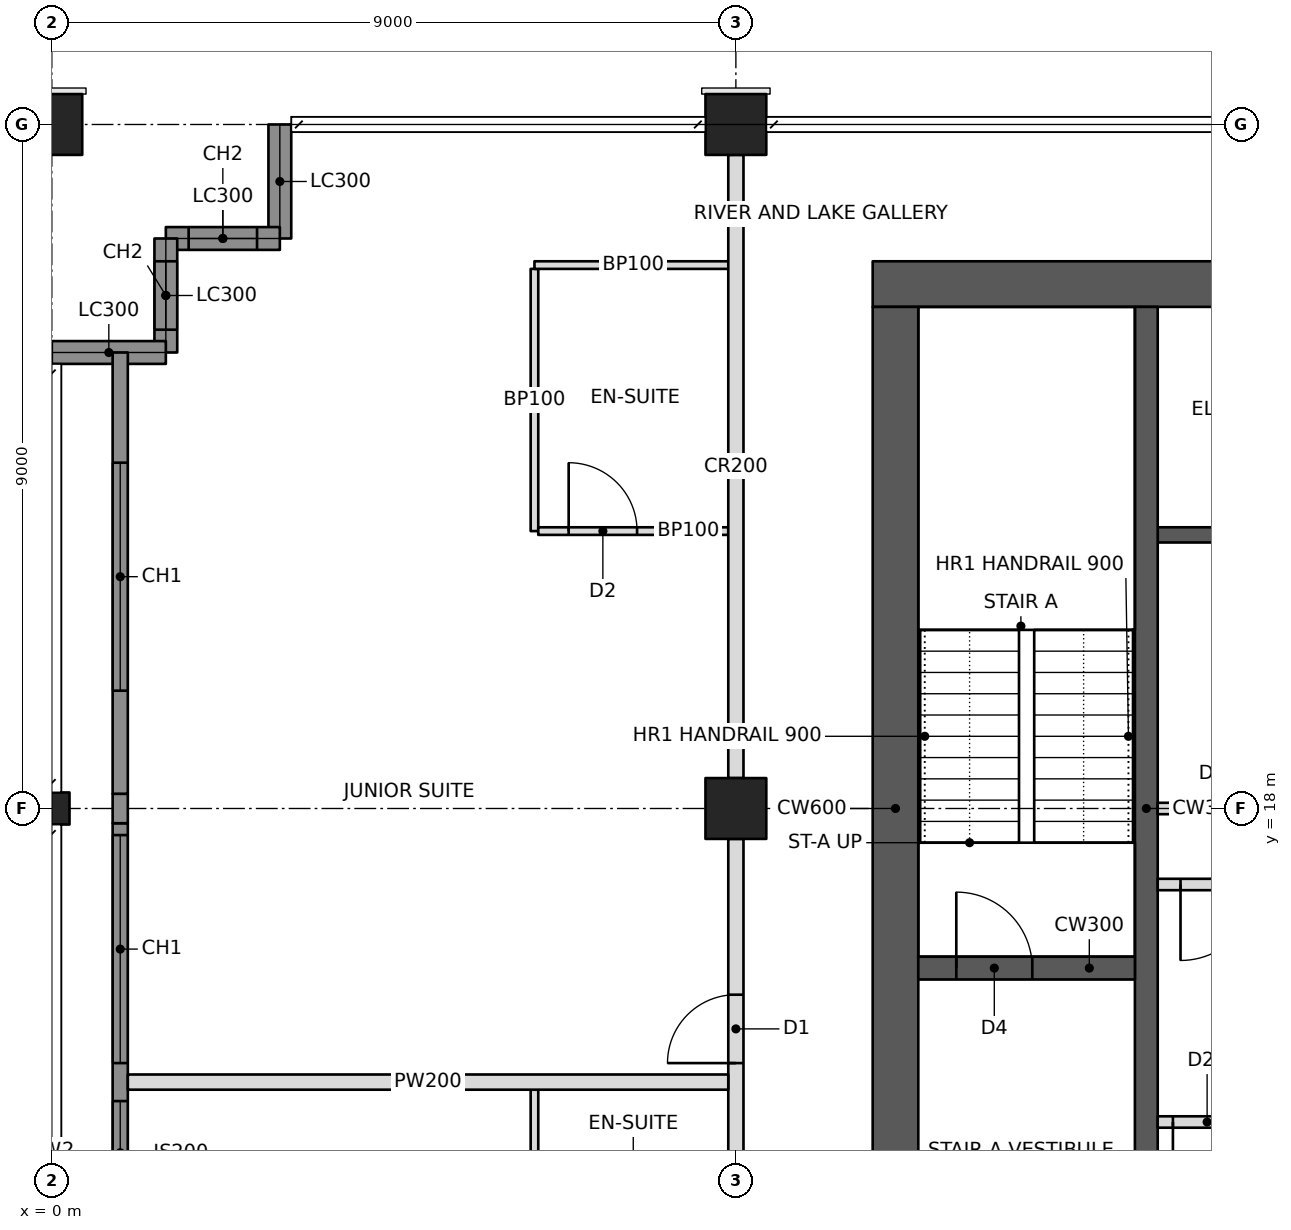
"""IFC4 building model, lengths in metres.
Left out: names, types, materials, properties, quantities, classifications, styles, units other than length and angle.
Written with IfcOpenShell. Run it as: python <this file> out.ifc"""

import sys

from ifc_helpers import new_model, si_unit, direction, frame, frame_2d, origin, origin_2d, place, context, subcontext, project, spatial, rectangle, hollow_rectangle, i_section, extrude, element, fill, save


model = new_model("IFC4")
c1 = context("Model", 3, precision=1e-05, world=origin(), true_north=direction((0.0, 1.0)))
c2 = subcontext(c1, "Body", "Model", "MODEL_VIEW")
j1 = project(units=[si_unit("LENGTHUNIT", "METRE"), si_unit("PLANEANGLEUNIT", "RADIAN")], contexts=[c1])
p1 = place(None, origin())
s1 = spatial("IfcSite", under=j1, at=p1, CompositionType="ELEMENT")
p2 = place(p1, origin())
s2 = spatial("IfcBuilding", under=s1, at=p2, CompositionType="ELEMENT")
p3 = place(p2, frame((0.0, 0.0, 244.6)))
s3 = spatial("IfcBuildingStorey", under=s2, at=p3, CompositionType="ELEMENT", Elevation=244.6)
p4 = place(p3, frame((0.0, 18.0, 0.0), z_axis=(0.0, 0.0, 1.0), x_axis=(0.0, 1.0, 0.0)))
e1 = element("IfcColumn", 1, at=p4, inside=s3, PredefinedType="COLUMN", context=c2, shape_type="SweptSolid", body=[
    extrude(i_section(OverallWidth=0.422, OverallDepth=0.465, WebThickness=0.045, FlangeThickness=0.073, at=origin_2d()), origin(), (0.0, 0.0, 1.0), 3.6),
])
p5 = place(p3, frame((0.0, 27.0, 0.0), z_axis=(0.0, 0.0, 1.0), x_axis=(0.0, 1.0, 0.0)))
e2 = element("IfcColumn", 2, at=p5, inside=s3, PredefinedType="COLUMN", context=c2, shape_type="SweptSolid", body=[
    extrude(hollow_rectangle(XDim=0.8, YDim=0.8, WallThickness=0.05, at=origin_2d()), origin(), (0.0, 0.0, 1.0), 3.6),
])
p6 = place(p3, frame((9.0, 18.0, 0.0), z_axis=(0.0, 0.0, 1.0), x_axis=(1.0, 0.0, 0.0)))
e3 = element("IfcColumn", 3, at=p6, inside=s3, PredefinedType="COLUMN", context=c2, shape_type="SweptSolid", body=[
    extrude(hollow_rectangle(XDim=0.8, YDim=0.8, WallThickness=0.04, at=origin_2d()), origin(), (0.0, 0.0, 1.0), 3.6),
])
p7 = place(p3, frame((9.0, 27.0, 0.0), z_axis=(0.0, 0.0, 1.0), x_axis=(1.0, 0.0, 0.0)))
e4 = element("IfcColumn", 4, at=p7, inside=s3, PredefinedType="COLUMN", context=c2, shape_type="SweptSolid", body=[
    extrude(hollow_rectangle(XDim=0.8, YDim=0.8, WallThickness=0.05, at=origin_2d()), origin(), (0.0, 0.0, 1.0), 3.6),
])
p8 = place(p3, frame((10.8, 24.9, 0.0), z_axis=(0.0, 0.0, 1.0), x_axis=(1.0, 0.0, 0.0)))
e5 = element("IfcWall", 5, at=p8, inside=s3, PredefinedType="SHEAR", context=c2, shape_type="SweptSolid", body=[
    extrude(rectangle(XDim=23.4, YDim=0.6, at=frame_2d((11.7, 0.0))), origin(), (0.0, 0.0, 1.0), 3.6),
])
p9 = place(p8, frame((17.2, 0.0, 0.0)))
e6 = element("IfcOpeningElement", 6, at=p9, cuts=e5, PredefinedType="OPENING", context=c2, shape_type="SweptSolid", body=[
    extrude(rectangle(XDim=1.8, YDim=2.1, at=frame_2d((0.9, 1.05))), frame((0.0, 0.31, 0.0), z_axis=(0.0, -1.0, 0.0), x_axis=(1.0, 0.0, 0.0)), (0.0, 0.0, 1.0), 0.62),
])
p10 = place(p8, frame((21.1, 0.0, 0.0)))
e7 = element("IfcOpeningElement", 7, at=p10, cuts=e5, PredefinedType="OPENING", context=c2, shape_type="SweptSolid", body=[
    extrude(rectangle(XDim=1.0, YDim=2.1, at=frame_2d((0.5, 1.05))), frame((0.0, 0.31, 0.0), z_axis=(0.0, -1.0, 0.0), x_axis=(1.0, 0.0, 0.0)), (0.0, 0.0, 1.0), 0.62),
])
p11 = place(p8, frame((4.9, 0.0, 0.0)))
e8 = element("IfcOpeningElement", 8, at=p11, cuts=e5, PredefinedType="OPENING", context=c2, shape_type="SweptSolid", body=[
    extrude(rectangle(XDim=1.0, YDim=2.1, at=frame_2d((0.5, 1.05))), frame((0.0, 0.31, 0.0), z_axis=(0.0, -1.0, 0.0), x_axis=(1.0, 0.0, 0.0)), (0.0, 0.0, 1.0), 0.62),
])
p12 = place(p3, frame((11.1, 11.4, 0.0), z_axis=(0.0, 0.0, 1.0), x_axis=(0.0, 1.0, 0.0)))
e9 = element("IfcWall", 9, at=p12, inside=s3, PredefinedType="SHEAR", context=c2, shape_type="SweptSolid", body=[
    extrude(rectangle(XDim=13.2, YDim=0.6, at=frame_2d((6.6, 0.0))), origin(), (0.0, 0.0, 1.0), 3.6),
])
p13 = place(p3, frame((14.4, 11.4, 0.0), z_axis=(0.0, 0.0, 1.0), x_axis=(0.0, 1.0, 0.0)))
e10 = element("IfcWall", 10, at=p13, inside=s3, PredefinedType="SHEAR", context=c2, shape_type="SweptSolid", body=[
    extrude(rectangle(XDim=13.2, YDim=0.3, at=frame_2d((6.6, 0.0))), origin(), (0.0, 0.0, 1.0), 3.6),
])
p14 = place(p3, frame((11.4, 15.9, 0.0), z_axis=(0.0, 0.0, 1.0), x_axis=(1.0, 0.0, 0.0)))
e11 = element("IfcWall", 11, at=p14, inside=s3, PredefinedType="SHEAR", context=c2, shape_type="SweptSolid", body=[
    extrude(rectangle(XDim=2.85, YDim=0.3, at=frame_2d((1.425, 0.0))), origin(), (0.0, 0.0, 1.0), 3.6),
])
p15 = place(p14, frame((0.5, 0.0, 0.0)))
e12 = element("IfcOpeningElement", 12, at=p15, cuts=e11, PredefinedType="OPENING", context=c2, shape_type="SweptSolid", body=[
    extrude(rectangle(XDim=1.0, YDim=2.1, at=frame_2d((0.5, 1.05))), frame((0.0, 0.16, 0.0), z_axis=(0.0, -1.0, 0.0), x_axis=(1.0, 0.0, 0.0)), (0.0, 0.0, 1.0), 0.32),
])
p16 = place(p3, frame((14.55, 18.0, 0.0), z_axis=(0.0, 0.0, 1.0), x_axis=(1.0, 0.0, 0.0)))
e13 = element("IfcWall", 13, at=p16, inside=s3, PredefinedType="PARTITIONING", context=c2, shape_type="SweptSolid", body=[
    extrude(rectangle(XDim=3.3, YDim=0.15, at=frame_2d((1.65, 0.0))), origin(), (0.0, 0.0, 1.0), 3.4),
])
p17 = place(p3, frame((14.55, 21.6, 0.0), z_axis=(0.0, 0.0, 1.0), x_axis=(1.0, 0.0, 0.0)))
e14 = element("IfcWall", 14, at=p17, inside=s3, PredefinedType="SHEAR", context=c2, shape_type="SweptSolid", body=[
    extrude(rectangle(XDim=3.3, YDim=0.2, at=frame_2d((1.65, 0.0))), origin(), (0.0, 0.0, 1.0), 3.6),
])
p18 = place(p3, frame((3.0, 27.0, 0.0), z_axis=(0.0, 0.0, 1.0), x_axis=(0.0, -1.0, 0.0)))
e15 = element("IfcWall", 15, at=p18, inside=s3, PredefinedType="SOLIDWALL", context=c2, shape_type="SweptSolid", body=[
    extrude(rectangle(XDim=1.5, YDim=0.3, at=frame_2d((0.75, 0.0))), origin(), (0.0, 0.0, 1.0), 2.62),
])
p19 = place(p3, frame((3.0, 25.5, 0.0), z_axis=(0.0, 0.0, 1.0), x_axis=(-1.0, 0.0, 0.0)))
e16 = element("IfcWall", 16, at=p19, inside=s3, PredefinedType="SOLIDWALL", context=c2, shape_type="SweptSolid", body=[
    extrude(rectangle(XDim=1.5, YDim=0.3, at=frame_2d((0.75, 0.0))), origin(), (0.0, 0.0, 1.0), 3.4),
])
p20 = place(p19, frame((0.3, 0.0, 0.6)))
e17 = element("IfcOpeningElement", 17, at=p20, cuts=e16, PredefinedType="OPENING", context=c2, shape_type="SweptSolid", body=[
    extrude(rectangle(XDim=0.9, YDim=2.2, at=frame_2d((0.45, 1.1))), frame((0.0, 0.16, 0.0), z_axis=(0.0, -1.0, 0.0), x_axis=(1.0, 0.0, 0.0)), (0.0, 0.0, 1.0), 0.32),
])
p21 = place(p3, frame((1.5, 25.5, 0.0), z_axis=(0.0, 0.0, 1.0), x_axis=(0.0, -1.0, 0.0)))
e18 = element("IfcWall", 18, at=p21, inside=s3, PredefinedType="SOLIDWALL", context=c2, shape_type="SweptSolid", body=[
    extrude(rectangle(XDim=1.5, YDim=0.3, at=frame_2d((0.75, 0.0))), origin(), (0.0, 0.0, 1.0), 3.4),
])
p22 = place(p21, frame((0.3, 0.0, 0.6)))
e19 = element("IfcOpeningElement", 19, at=p22, cuts=e18, PredefinedType="OPENING", context=c2, shape_type="SweptSolid", body=[
    extrude(rectangle(XDim=0.9, YDim=2.2, at=frame_2d((0.45, 1.1))), frame((0.0, 0.16, 0.0), z_axis=(0.0, -1.0, 0.0), x_axis=(1.0, 0.0, 0.0)), (0.0, 0.0, 1.0), 0.32),
])
p23 = place(p3, frame((1.5, 24.0, 0.0), z_axis=(0.0, 0.0, 1.0), x_axis=(-1.0, 0.0, 0.0)))
e20 = element("IfcWall", 20, at=p23, inside=s3, PredefinedType="SOLIDWALL", context=c2, shape_type="SweptSolid", body=[
    extrude(rectangle(XDim=1.5, YDim=0.3, at=frame_2d((0.75, 0.0))), origin(), (0.0, 0.0, 1.0), 2.62),
])
p24 = place(p3, frame((9.0, 10.8, 0.0), z_axis=(0.0, 0.0, 1.0), x_axis=(0.0, 1.0, 0.0)))
e21 = element("IfcWall", 21, at=p24, inside=s3, PredefinedType="PARTITIONING", context=c2, shape_type="SweptSolid", body=[
    extrude(rectangle(XDim=6.8, YDim=0.2, at=frame_2d((3.4, 0.0))), origin(), (0.0, 0.0, 1.0), 2.605),
])
p25 = place(p24, frame((0.25, 0.0, 0.0)))
e22 = element("IfcOpeningElement", 22, at=p25, cuts=e21, PredefinedType="OPENING", context=c2, shape_type="SweptSolid", body=[
    extrude(rectangle(XDim=0.9, YDim=2.1, at=frame_2d((0.45, 1.05))), frame((0.0, 0.11, 0.0), z_axis=(0.0, -1.0, 0.0), x_axis=(1.0, 0.0, 0.0)), (0.0, 0.0, 1.0), 0.22),
])
p26 = place(p24, frame((3.85, 0.0, 0.0)))
e23 = element("IfcOpeningElement", 23, at=p26, cuts=e21, PredefinedType="OPENING", context=c2, shape_type="SweptSolid", body=[
    extrude(rectangle(XDim=0.9, YDim=2.1, at=frame_2d((0.45, 1.05))), frame((0.0, 0.11, 0.0), z_axis=(0.0, -1.0, 0.0), x_axis=(1.0, 0.0, 0.0)), (0.0, 0.0, 1.0), 0.22),
])
p27 = place(p3, frame((9.0, 18.4, 0.0), z_axis=(0.0, 0.0, 1.0), x_axis=(0.0, 1.0, 0.0)))
e24 = element("IfcWall", 24, at=p27, inside=s3, PredefinedType="PARTITIONING", context=c2, shape_type="SweptSolid", body=[
    extrude(rectangle(XDim=8.2, YDim=0.2, at=frame_2d((4.1, 0.0))), origin(), (0.0, 0.0, 1.0), 2.605),
])
p28 = place(p3, frame((8.9, 14.4, 0.0), z_axis=(0.0, 0.0, 1.0), x_axis=(-1.0, 0.0, 0.0)))
e25 = element("IfcWall", 25, at=p28, inside=s3, PredefinedType="PARTITIONING", context=c2, shape_type="SweptSolid", body=[
    extrude(rectangle(XDim=7.9, YDim=0.2, at=frame_2d((3.95, 0.0))), origin(), (0.0, 0.0, 1.0), 2.604),
])
p29 = place(p3, frame((6.35, 12.25, 0.0), z_axis=(0.0, 0.0, 1.0), x_axis=(0.0, 1.0, 0.0)))
e26 = element("IfcWall", 26, at=p29, inside=s3, PredefinedType="PARTITIONING", context=c2, shape_type="SweptSolid", body=[
    extrude(rectangle(XDim=2.05, YDim=0.1, at=frame_2d((1.025, 0.0))), origin(), (0.0, 0.0, 1.0), 3.4),
])
p30 = place(p3, frame((6.35, 21.65, 0.0), z_axis=(0.0, 0.0, 1.0), x_axis=(0.0, 1.0, 0.0)))
e27 = element("IfcWall", 27, at=p30, inside=s3, PredefinedType="PARTITIONING", context=c2, shape_type="SweptSolid", body=[
    extrude(rectangle(XDim=3.45, YDim=0.1, at=frame_2d((1.725, 0.0))), origin(), (0.0, 0.0, 1.0), 3.4),
])
p31 = place(p3, frame((8.9, 21.65, 0.0), z_axis=(0.0, 0.0, 1.0), x_axis=(-1.0, 0.0, 0.0)))
e28 = element("IfcWall", 28, at=p31, inside=s3, PredefinedType="PARTITIONING", context=c2, shape_type="SweptSolid", body=[
    extrude(rectangle(XDim=2.5, YDim=0.1, at=frame_2d((1.25, 0.0))), origin(), (0.0, 0.0, 1.0), 2.604),
])
p32 = place(p31, frame((1.2, 0.0, 0.0)))
e29 = element("IfcOpeningElement", 29, at=p32, cuts=e28, PredefinedType="OPENING", context=c2, shape_type="SweptSolid", body=[
    extrude(rectangle(XDim=0.9, YDim=2.1, at=frame_2d((0.45, 1.05))), frame((0.0, 0.06, 0.0), z_axis=(0.0, -1.0, 0.0), x_axis=(1.0, 0.0, 0.0)), (0.0, 0.0, 1.0), 0.12),
])
p33 = place(p3, frame((6.35, 25.15, 0.0), z_axis=(0.0, 0.0, 1.0), x_axis=(1.0, 0.0, 0.0)))
e30 = element("IfcWall", 30, at=p33, inside=s3, PredefinedType="PARTITIONING", context=c2, shape_type="SweptSolid", body=[
    extrude(rectangle(XDim=2.6, YDim=0.1, at=frame_2d((1.3, 0.0))), origin(), (0.0, 0.0, 1.0), 2.604),
])
p34 = place(p3, frame((14.55, 17.0, 0.0), z_axis=(0.0, 0.0, 1.0), x_axis=(1.0, 0.0, 0.0)))
e31 = element("IfcWall", 31, at=p34, inside=s3, PredefinedType="PARTITIONING", context=c2, shape_type="SweptSolid", body=[
    extrude(rectangle(XDim=3.3, YDim=0.15, at=frame_2d((1.65, 0.0))), origin(), (0.0, 0.0, 1.0), 3.4),
])
p35 = place(p34, frame((0.3, 0.0, 0.0)))
e32 = element("IfcOpeningElement", 32, at=p35, cuts=e31, PredefinedType="OPENING", context=c2, shape_type="SweptSolid", body=[
    extrude(rectangle(XDim=1.0, YDim=2.1, at=frame_2d((0.5, 1.05))), frame((0.0, 0.085, 0.0), z_axis=(0.0, -1.0, 0.0), x_axis=(1.0, 0.0, 0.0)), (0.0, 0.0, 1.0), 0.17),
])
p36 = place(p3, frame((14.55, 13.875, 0.0), z_axis=(0.0, 0.0, 1.0), x_axis=(1.0, 0.0, 0.0)))
e33 = element("IfcWall", 33, at=p36, inside=s3, PredefinedType="PARTITIONING", context=c2, shape_type="SweptSolid", body=[
    extrude(rectangle(XDim=3.3, YDim=0.15, at=frame_2d((1.65, 0.0))), origin(), (0.0, 0.0, 1.0), 3.4),
])
p37 = place(p36, frame((0.2, 0.0, 0.0)))
e34 = element("IfcOpeningElement", 34, at=p37, cuts=e33, PredefinedType="OPENING", context=c2, shape_type="SweptSolid", body=[
    extrude(rectangle(XDim=0.9, YDim=2.1, at=frame_2d((0.45, 1.05))), frame((0.0, 0.085, 0.0), z_axis=(0.0, -1.0, 0.0), x_axis=(1.0, 0.0, 0.0)), (0.0, 0.0, 1.0), 0.17),
])
p38 = place(p36, frame((1.8, 0.0, 0.0)))
e35 = element("IfcOpeningElement", 35, at=p38, cuts=e33, PredefinedType="OPENING", context=c2, shape_type="SweptSolid", body=[
    extrude(rectangle(XDim=0.9, YDim=2.1, at=frame_2d((0.45, 1.05))), frame((0.0, 0.085, 0.0), z_axis=(0.0, -1.0, 0.0), x_axis=(1.0, 0.0, 0.0)), (0.0, 0.0, 1.0), 0.17),
])
p39 = place(p3, frame((0.9, 9.135, 0.0), z_axis=(0.0, 0.0, 1.0), x_axis=(0.0, 1.0, 0.0)))
e36 = element("IfcWall", 36, at=p39, inside=s3, PredefinedType="SOLIDWALL", context=c2, shape_type="SweptSolid", body=[
    extrude(rectangle(XDim=8.671, YDim=0.2, at=frame_2d((4.335, 0.0))), origin(), (0.0, 0.0, 1.0), 3.4),
])
p40 = place(p39, frame((2.015, 0.0, 0.6)))
e37 = element("IfcOpeningElement", 37, at=p40, cuts=e36, PredefinedType="OPENING", context=c2, shape_type="SweptSolid", body=[
    extrude(rectangle(XDim=3.0, YDim=2.2, at=frame_2d((1.5, 1.1))), frame((0.0, 0.11, 0.0), z_axis=(0.0, -1.0, 0.0), x_axis=(1.0, 0.0, 0.0)), (0.0, 0.0, 1.0), 0.22),
])
p41 = place(p39, frame((5.515, 0.0, 0.6)))
e38 = element("IfcOpeningElement", 38, at=p41, cuts=e36, PredefinedType="OPENING", context=c2, shape_type="SweptSolid", body=[
    extrude(rectangle(XDim=3.0, YDim=2.2, at=frame_2d((1.5, 1.1))), frame((0.0, 0.11, 0.0), z_axis=(0.0, -1.0, 0.0), x_axis=(1.0, 0.0, 0.0)), (0.0, 0.0, 1.0), 0.22),
])
p42 = place(p3, frame((0.9, 17.806, 0.0), z_axis=(0.0, 0.0, 1.0), x_axis=(0.0, 1.0, 0.0)))
e39 = element("IfcWall", 39, at=p42, inside=s3, PredefinedType="SOLIDWALL", context=c2, shape_type="SweptSolid", body=[
    extrude(rectangle(XDim=0.388, YDim=0.2, at=frame_2d((0.194, 0.0))), origin(), (0.0, 0.0, 1.0), 2.604),
])
p43 = place(p3, frame((0.9, 18.194, 0.0), z_axis=(0.0, 0.0, 1.0), x_axis=(0.0, 1.0, 0.0)))
e40 = element("IfcWall", 40, at=p43, inside=s3, PredefinedType="SOLIDWALL", context=c2, shape_type="SweptSolid", body=[
    extrude(rectangle(XDim=5.806, YDim=0.2, at=frame_2d((2.903, 0.0))), origin(), (0.0, 0.0, 1.0), 3.4),
])
p44 = place(p43, frame((1.356, 0.0, 0.6)))
e41 = element("IfcOpeningElement", 41, at=p44, cuts=e40, PredefinedType="OPENING", context=c2, shape_type="SweptSolid", body=[
    extrude(rectangle(XDim=3.0, YDim=2.2, at=frame_2d((1.5, 1.1))), frame((0.0, 0.11, 0.0), z_axis=(0.0, -1.0, 0.0), x_axis=(1.0, 0.0, 0.0)), (0.0, 0.0, 1.0), 0.22),
])
p45 = place(p20, origin())
e42 = element("IfcWindow", 42, at=p45, inside=s3, PartitioningType="SINGLE_PANEL", PredefinedType="WINDOW", context=c2, shape_type="SweptSolid", body=[
    extrude(rectangle(XDim=0.9, YDim=2.2, at=frame_2d((0.45, 1.1))), frame((0.0, 0.03, 0.0), z_axis=(0.0, -1.0, 0.0), x_axis=(1.0, 0.0, 0.0)), (0.0, 0.0, 1.0), 0.06),
])
fill(e17, e42)
p46 = place(p22, origin())
e43 = element("IfcWindow", 43, at=p46, inside=s3, PartitioningType="SINGLE_PANEL", PredefinedType="WINDOW", context=c2, shape_type="SweptSolid", body=[
    extrude(rectangle(XDim=0.9, YDim=2.2, at=frame_2d((0.45, 1.1))), frame((0.0, 0.03, 0.0), z_axis=(0.0, -1.0, 0.0), x_axis=(1.0, 0.0, 0.0)), (0.0, 0.0, 1.0), 0.06),
])
fill(e19, e43)
p47 = place(p40, origin())
e44 = element("IfcWindow", 44, at=p47, inside=s3, PartitioningType="TRIPLE_PANEL_VERTICAL", PredefinedType="WINDOW", context=c2, shape_type="SweptSolid", body=[
    extrude(rectangle(XDim=3.0, YDim=2.2, at=frame_2d((1.5, 1.1))), frame((0.0, 0.03, 0.0), z_axis=(0.0, -1.0, 0.0), x_axis=(1.0, 0.0, 0.0)), (0.0, 0.0, 1.0), 0.06),
])
fill(e37, e44)
p48 = place(p41, origin())
e45 = element("IfcWindow", 45, at=p48, inside=s3, PartitioningType="TRIPLE_PANEL_VERTICAL", PredefinedType="WINDOW", context=c2, shape_type="SweptSolid", body=[
    extrude(rectangle(XDim=3.0, YDim=2.2, at=frame_2d((1.5, 1.1))), frame((0.0, 0.03, 0.0), z_axis=(0.0, -1.0, 0.0), x_axis=(1.0, 0.0, 0.0)), (0.0, 0.0, 1.0), 0.06),
])
fill(e38, e45)
p49 = place(p44, origin())
e46 = element("IfcWindow", 46, at=p49, inside=s3, PartitioningType="TRIPLE_PANEL_VERTICAL", PredefinedType="WINDOW", context=c2, shape_type="SweptSolid", body=[
    extrude(rectangle(XDim=3.0, YDim=2.2, at=frame_2d((1.5, 1.1))), frame((0.0, 0.03, 0.0), z_axis=(0.0, -1.0, 0.0), x_axis=(1.0, 0.0, 0.0)), (0.0, 0.0, 1.0), 0.06),
])
fill(e41, e46)
p50 = place(p32, frame((0.9, 0.0, 0.0), z_axis=(0.0, 0.0, 1.0), x_axis=(-1.0, 0.0, 0.0)))
e47 = element("IfcDoor", 47, at=p50, inside=s3, OperationType="SINGLE_SWING_LEFT", PredefinedType="DOOR", context=c2, shape_type="SweptSolid", body=[
    extrude(rectangle(XDim=0.9, YDim=2.1, at=frame_2d((0.45, 1.05))), frame((0.0, 0.025, 0.0), z_axis=(0.0, -1.0, 0.0), x_axis=(1.0, 0.0, 0.0)), (0.0, 0.0, 1.0), 0.05),
])
fill(e29, e47)
p51 = place(p26, origin())
e48 = element("IfcDoor", 48, at=p51, inside=s3, OperationType="SINGLE_SWING_LEFT", PredefinedType="DOOR", context=c2, shape_type="SweptSolid", body=[
    extrude(rectangle(XDim=0.9, YDim=2.1, at=frame_2d((0.45, 1.05))), frame((0.0, 0.025, 0.0), z_axis=(0.0, -1.0, 0.0), x_axis=(1.0, 0.0, 0.0)), (0.0, 0.0, 1.0), 0.05),
])
fill(e23, e48)
p52 = place(p35, frame((1.0, 0.0, 0.0), z_axis=(0.0, 0.0, 1.0), x_axis=(-1.0, 0.0, 0.0)))
e49 = element("IfcDoor", 49, at=p52, inside=s3, OperationType="SINGLE_SWING_RIGHT", PredefinedType="DOOR", context=c2, shape_type="SweptSolid", body=[
    extrude(rectangle(XDim=1.0, YDim=2.1, at=frame_2d((0.5, 1.05))), frame((0.0, 0.025, 0.0), z_axis=(0.0, -1.0, 0.0), x_axis=(1.0, 0.0, 0.0)), (0.0, 0.0, 1.0), 0.05),
])
fill(e32, e49)
p53 = place(p37, frame((0.9, 0.0, 0.0), z_axis=(0.0, 0.0, 1.0), x_axis=(-1.0, 0.0, 0.0)))
e50 = element("IfcDoor", 50, at=p53, inside=s3, OperationType="SINGLE_SWING_RIGHT", PredefinedType="DOOR", context=c2, shape_type="SweptSolid", body=[
    extrude(rectangle(XDim=0.9, YDim=2.1, at=frame_2d((0.45, 1.05))), frame((0.0, 0.025, 0.0), z_axis=(0.0, -1.0, 0.0), x_axis=(1.0, 0.0, 0.0)), (0.0, 0.0, 1.0), 0.05),
])
fill(e34, e50)
p54 = place(p15, origin())
e51 = element("IfcDoor", 51, at=p54, inside=s3, OperationType="SINGLE_SWING_LEFT", PredefinedType="DOOR", context=c2, shape_type="SweptSolid", body=[
    extrude(rectangle(XDim=1.0, YDim=2.1, at=frame_2d((0.5, 1.05))), frame((0.0, 0.025, 0.0), z_axis=(0.0, -1.0, 0.0), x_axis=(1.0, 0.0, 0.0)), (0.0, 0.0, 1.0), 0.05),
])
fill(e12, e51)
save(model, sys.argv[1])
